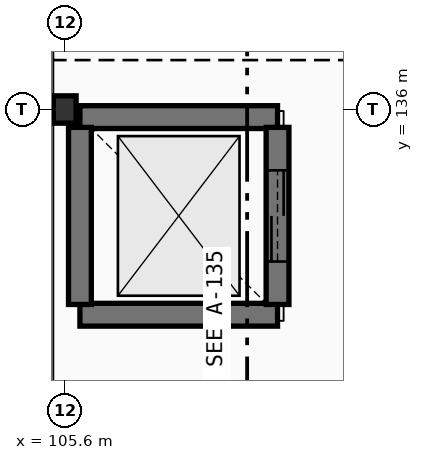
"""IFC4 building model, lengths in metres.
Left out: names, types, materials, properties, quantities, classifications, styles, units other than length and angle.
Written with IfcOpenShell. Run it as: python <this file> out.ifc"""

import sys

from ifc_helpers import new_model, si_unit, direction, frame, frame_2d, origin, origin_2d, place, context, subcontext, project, spatial, rectangle, i_section, extrude, element, fill, save


model = new_model("IFC4")
c1 = context("Model", 3, precision=1e-05, world=origin(), true_north=direction((0.0, 1.0)))
c2 = subcontext(c1, "Body", "Model", "MODEL_VIEW")
j1 = project(units=[si_unit("LENGTHUNIT", "METRE"), si_unit("PLANEANGLEUNIT", "RADIAN")], contexts=[c1])
p1 = place(None, origin())
s1 = spatial("IfcSite", under=j1, at=p1, CompositionType="ELEMENT")
p2 = place(p1, origin())
s2 = spatial("IfcBuilding", under=s1, at=p2, CompositionType="ELEMENT")
p3 = place(p2, frame((0.0, 0.0, 6.0)))
s3 = spatial("IfcBuildingStorey", under=s2, at=p3, CompositionType="ELEMENT", Elevation=6.0)
p4 = place(p3, frame((105.6, 136.0, 0.0), z_axis=(0.0, 0.0, 1.0), x_axis=(1.0, 0.0, 0.0)))
e1 = element("IfcColumn", 1, at=p4, inside=s3, PredefinedType="COLUMN", context=c2, shape_type="SweptSolid", body=[
    extrude(i_section(OverallWidth=0.3, OverallDepth=0.36, WebThickness=0.012, FlangeThickness=0.022, FilletRadius=0.027, at=origin_2d()), origin(), (0.0, 0.0, 1.0), 5.4),
])
for number, where, z_axis, x_axis in (
    (2, (108.4, 135.9, 0.0), (0.0, 0.0, 1.0), (-1.0, 0.0, 0.0)),
    (3, (105.8, 133.3, 0.0), (0.0, 0.0, 1.0), (1.0, 0.0, 0.0)),
):
    element("IfcWall", number, at=place(p3, frame(where, z_axis=z_axis, x_axis=x_axis)), inside=s3, PredefinedType="SHEAR", context=c2, shape_type="SweptSolid", body=[
        extrude(rectangle(XDim=2.6, YDim=0.3, at=frame_2d((1.3, 0.0))), origin(), (0.0, 0.0, 1.0), 5.17),
    ])
p5 = place(p3, frame((108.4, 133.435, 0.0), z_axis=(0.0, 0.0, 1.0), x_axis=(0.0, 1.0, 0.0)))
e4 = element("IfcWall", 4, at=p5, inside=s3, PredefinedType="SHEAR", context=c2, shape_type="SweptSolid", body=[
    extrude(rectangle(XDim=2.33, YDim=0.3, at=frame_2d((1.165, 0.0))), origin(), (0.0, 0.0, 1.0), 5.17),
])
p6 = place(p5, frame((0.565, 0.0, 0.0)))
e5 = element("IfcOpeningElement", 5, at=p6, cuts=e4, PredefinedType="OPENING", context=c2, shape_type="SweptSolid", body=[
    extrude(rectangle(XDim=1.2, YDim=2.2, at=frame_2d((0.6, 1.1))), frame((0.0, 0.16, 0.0), z_axis=(0.0, -1.0, 0.0), x_axis=(1.0, 0.0, 0.0)), (0.0, 0.0, 1.0), 0.32),
])
p7 = place(p3, frame((105.8, 135.765, 0.0), z_axis=(0.0, 0.0, 1.0), x_axis=(0.0, -1.0, 0.0)))
e6 = element("IfcWall", 6, at=p7, inside=s3, PredefinedType="SHEAR", context=c2, shape_type="SweptSolid", body=[
    extrude(rectangle(XDim=2.33, YDim=0.3, at=frame_2d((1.165, 0.0))), origin(), (0.0, 0.0, 1.0), 5.17),
])
p8 = place(p6, origin())
e7 = element("IfcDoor", 7, at=p8, inside=s3, OperationType="DOUBLE_DOOR_SLIDING", PredefinedType="DOOR", context=c2, shape_type="SweptSolid", body=[
    extrude(rectangle(XDim=1.2, YDim=2.2, at=frame_2d((0.6, 1.1))), frame((0.0, 0.025, 0.0), z_axis=(0.0, -1.0, 0.0), x_axis=(1.0, 0.0, 0.0)), (0.0, 0.0, 1.0), 0.05),
])
fill(e5, e7)
save(model, sys.argv[1])
